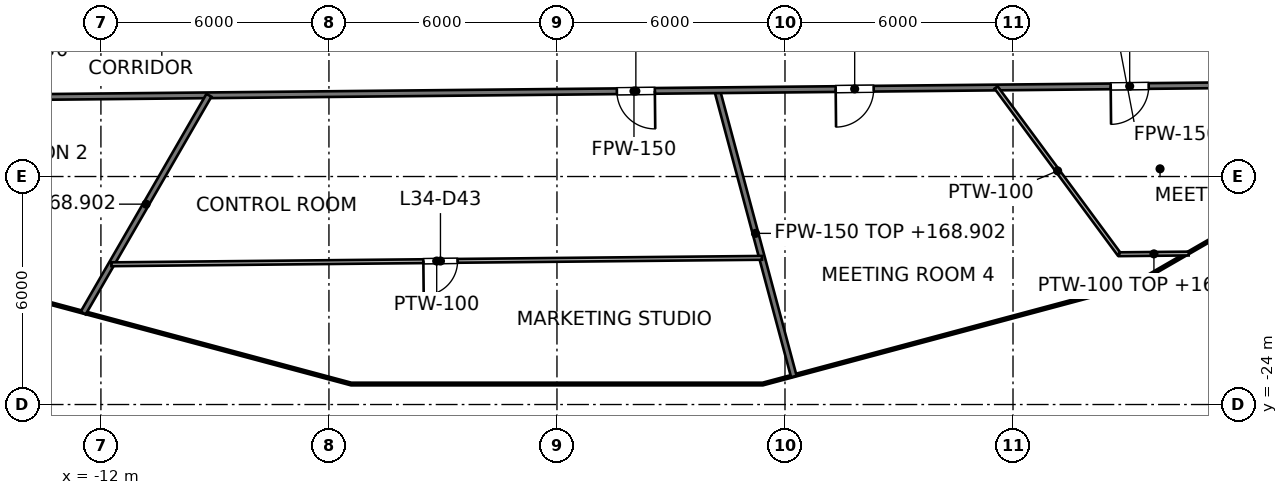
"""IFC4 building model, lengths in metres.
Left out: names, types, materials, properties, quantities, classifications, styles, units other than length and angle.
Written with IfcOpenShell. Run it as: python <this file> out.ifc"""

import sys

from ifc_helpers import new_model, si_unit, direction, frame, frame_2d, origin, place, context, subcontext, project, spatial, rectangle, extrude, element, fill, save


model = new_model("IFC4")
c1 = context("Model", 3, precision=1e-05, world=origin(), true_north=direction((0.0, 1.0)))
c2 = subcontext(c1, "Body", "Model", "MODEL_VIEW")
j1 = project(units=[si_unit("LENGTHUNIT", "METRE"), si_unit("PLANEANGLEUNIT", "RADIAN")], contexts=[c1])
p1 = place(None, origin())
s1 = spatial("IfcSite", under=j1, at=p1, CompositionType="ELEMENT")
p2 = place(p1, origin())
s2 = spatial("IfcBuilding", under=s1, at=p2, CompositionType="ELEMENT")
p3 = place(p2, frame((0.0, 0.0, 165.6)))
s3 = spatial("IfcBuildingStorey", under=s2, at=p3, CompositionType="ELEMENT", Elevation=165.6)
p4 = place(p3, frame((4.215, -15.73, 0.0), z_axis=(0.0, 0.0, 1.0), x_axis=(0.258804423338, -0.96592974406, 0.0)))
e1 = element("IfcWall", 1, at=p4, inside=s3, PredefinedType="PARTITIONING", context=c2, shape_type="SweptSolid", body=[
    extrude(rectangle(XDim=7.798, YDim=0.15, at=frame_2d((3.899, 0.0))), origin(), (0.0, 0.0, 1.0), 3.302),
])
p5 = place(p3, frame((-14.534, -15.916, 0.0), z_axis=(0.0, 0.0, 1.0), x_axis=(0.999950930262, 0.009906415532, 0.0)))
e2 = element("IfcWall", 2, at=p5, inside=s3, PredefinedType="PARTITIONING", context=c2, shape_type="SweptSolid", body=[
    extrude(rectangle(XDim=33.123, YDim=0.15, at=frame_2d((16.561, 0.0))), origin(), (0.0, 0.0, 1.0), 2.927),
])
p6 = place(p5, frame((16.111, 0.0, 0.0)))
e3 = element("IfcOpeningElement", 3, at=p6, cuts=e2, PredefinedType="OPENING", context=c2, shape_type="SweptSolid", body=[
    extrude(rectangle(XDim=1.0, YDim=2.1, at=frame_2d((0.5, 1.05))), frame((0.0, 0.075, 0.0), z_axis=(0.0, -1.0, 0.0), x_axis=(1.0, 0.0, 0.0)), (0.0, 0.0, 1.0), 0.15),
])
p7 = place(p5, frame((21.869, 0.0, 0.0)))
e4 = element("IfcOpeningElement", 4, at=p7, cuts=e2, PredefinedType="OPENING", context=c2, shape_type="SweptSolid", body=[
    extrude(rectangle(XDim=1.0, YDim=2.1, at=frame_2d((0.5, 1.05))), frame((0.0, 0.075, 0.0), z_axis=(0.0, -1.0, 0.0), x_axis=(1.0, 0.0, 0.0)), (0.0, 0.0, 1.0), 0.15),
])
p8 = place(p5, frame((29.106, 0.0, 0.0)))
e5 = element("IfcOpeningElement", 5, at=p8, cuts=e2, PredefinedType="OPENING", context=c2, shape_type="SweptSolid", body=[
    extrude(rectangle(XDim=1.0, YDim=2.1, at=frame_2d((0.5, 1.05))), frame((0.0, 0.075, 0.0), z_axis=(0.0, -1.0, 0.0), x_axis=(1.0, 0.0, 0.0)), (0.0, 0.0, 1.0), 0.15),
])
p9 = place(p3, frame((-12.466, -21.592, 0.0), z_axis=(0.0, 0.0, 1.0), x_axis=(0.500008890998, 0.866020270503, 0.0)))
e6 = element("IfcWall", 6, at=p9, inside=s3, PredefinedType="PARTITIONING", context=c2, shape_type="SweptSolid", body=[
    extrude(rectangle(XDim=6.616, YDim=0.15, at=frame_2d((3.308, 0.0))), origin(), (0.0, 0.0, 1.0), 3.302),
])
p10 = place(p3, frame((11.555, -15.657, 0.0), z_axis=(0.0, 0.0, 1.0), x_axis=(0.593887483444, -0.80454810733, 0.0)))
e7 = element("IfcWall", 7, at=p10, inside=s3, PredefinedType="PARTITIONING", context=c2, shape_type="SweptSolid", body=[
    extrude(rectangle(XDim=5.454, YDim=0.1, at=frame_2d((2.727, 0.0))), origin(), (0.0, 0.0, 1.0), 2.927),
])
p11 = place(p3, frame((-11.725, -20.309, 0.0), z_axis=(0.0, 0.0, 1.0), x_axis=(0.999951318094, 0.009867190168, 0.0)))
e8 = element("IfcWall", 8, at=p11, inside=s3, PredefinedType="PARTITIONING", context=c2, shape_type="SweptSolid", body=[
    extrude(rectangle(XDim=17.122, YDim=0.1, at=frame_2d((8.561, 0.0))), origin(), (0.0, 0.0, 1.0), 2.927),
])
p12 = place(p11, frame((8.21, 0.0, 0.0)))
e9 = element("IfcOpeningElement", 9, at=p12, cuts=e8, PredefinedType="OPENING", context=c2, shape_type="SweptSolid", body=[
    extrude(rectangle(XDim=0.9, YDim=2.1, at=frame_2d((0.45, 1.05))), frame((0.0, 0.05, 0.0), z_axis=(0.0, -1.0, 0.0), x_axis=(1.0, 0.0, 0.0)), (0.0, 0.0, 1.0), 0.1),
])
p13 = place(p3, frame((14.794, -20.045, 0.0), z_axis=(0.0, 0.0, 1.0), x_axis=(0.999952482553, 0.00974846838, 0.0)))
e10 = element("IfcWall", 10, at=p13, inside=s3, PredefinedType="PARTITIONING", context=c2, shape_type="SweptSolid", body=[
    extrude(rectangle(XDim=1.828, YDim=0.1, at=frame_2d((0.914, 0.0))), origin(), (0.0, 0.0, 1.0), 3.373),
])
p14 = place(p6, origin())
e11 = element("IfcDoor", 11, at=p14, inside=s3, OperationType="SINGLE_SWING_RIGHT", PredefinedType="DOOR", context=c2, shape_type="SweptSolid", body=[
    extrude(rectangle(XDim=1.0, YDim=2.1, at=frame_2d((0.5, 1.05))), frame((0.0, 0.025, 0.0), z_axis=(0.0, -1.0, 0.0), x_axis=(1.0, 0.0, 0.0)), (0.0, 0.0, 1.0), 0.05),
])
fill(e3, e11)
p15 = place(p12, origin())
e12 = element("IfcDoor", 12, at=p15, inside=s3, OperationType="SINGLE_SWING_LEFT", PredefinedType="DOOR", context=c2, shape_type="SweptSolid", body=[
    extrude(rectangle(XDim=0.9, YDim=2.1, at=frame_2d((0.45, 1.05))), frame((0.0, 0.025, 0.0), z_axis=(0.0, -1.0, 0.0), x_axis=(1.0, 0.0, 0.0)), (0.0, 0.0, 1.0), 0.05),
])
fill(e9, e12)
p16 = place(p7, origin())
e13 = element("IfcDoor", 13, at=p16, inside=s3, OperationType="SINGLE_SWING_LEFT", PredefinedType="DOOR", context=c2, shape_type="SweptSolid", body=[
    extrude(rectangle(XDim=1.0, YDim=2.1, at=frame_2d((0.5, 1.05))), frame((0.0, 0.025, 0.0), z_axis=(0.0, -1.0, 0.0), x_axis=(1.0, 0.0, 0.0)), (0.0, 0.0, 1.0), 0.05),
])
fill(e4, e13)
p17 = place(p8, origin())
e14 = element("IfcDoor", 14, at=p17, inside=s3, OperationType="SINGLE_SWING_LEFT", PredefinedType="DOOR", context=c2, shape_type="SweptSolid", body=[
    extrude(rectangle(XDim=1.0, YDim=2.1, at=frame_2d((0.5, 1.05))), frame((0.0, 0.025, 0.0), z_axis=(0.0, -1.0, 0.0), x_axis=(1.0, 0.0, 0.0)), (0.0, 0.0, 1.0), 0.05),
])
fill(e5, e14)
save(model, sys.argv[1])
